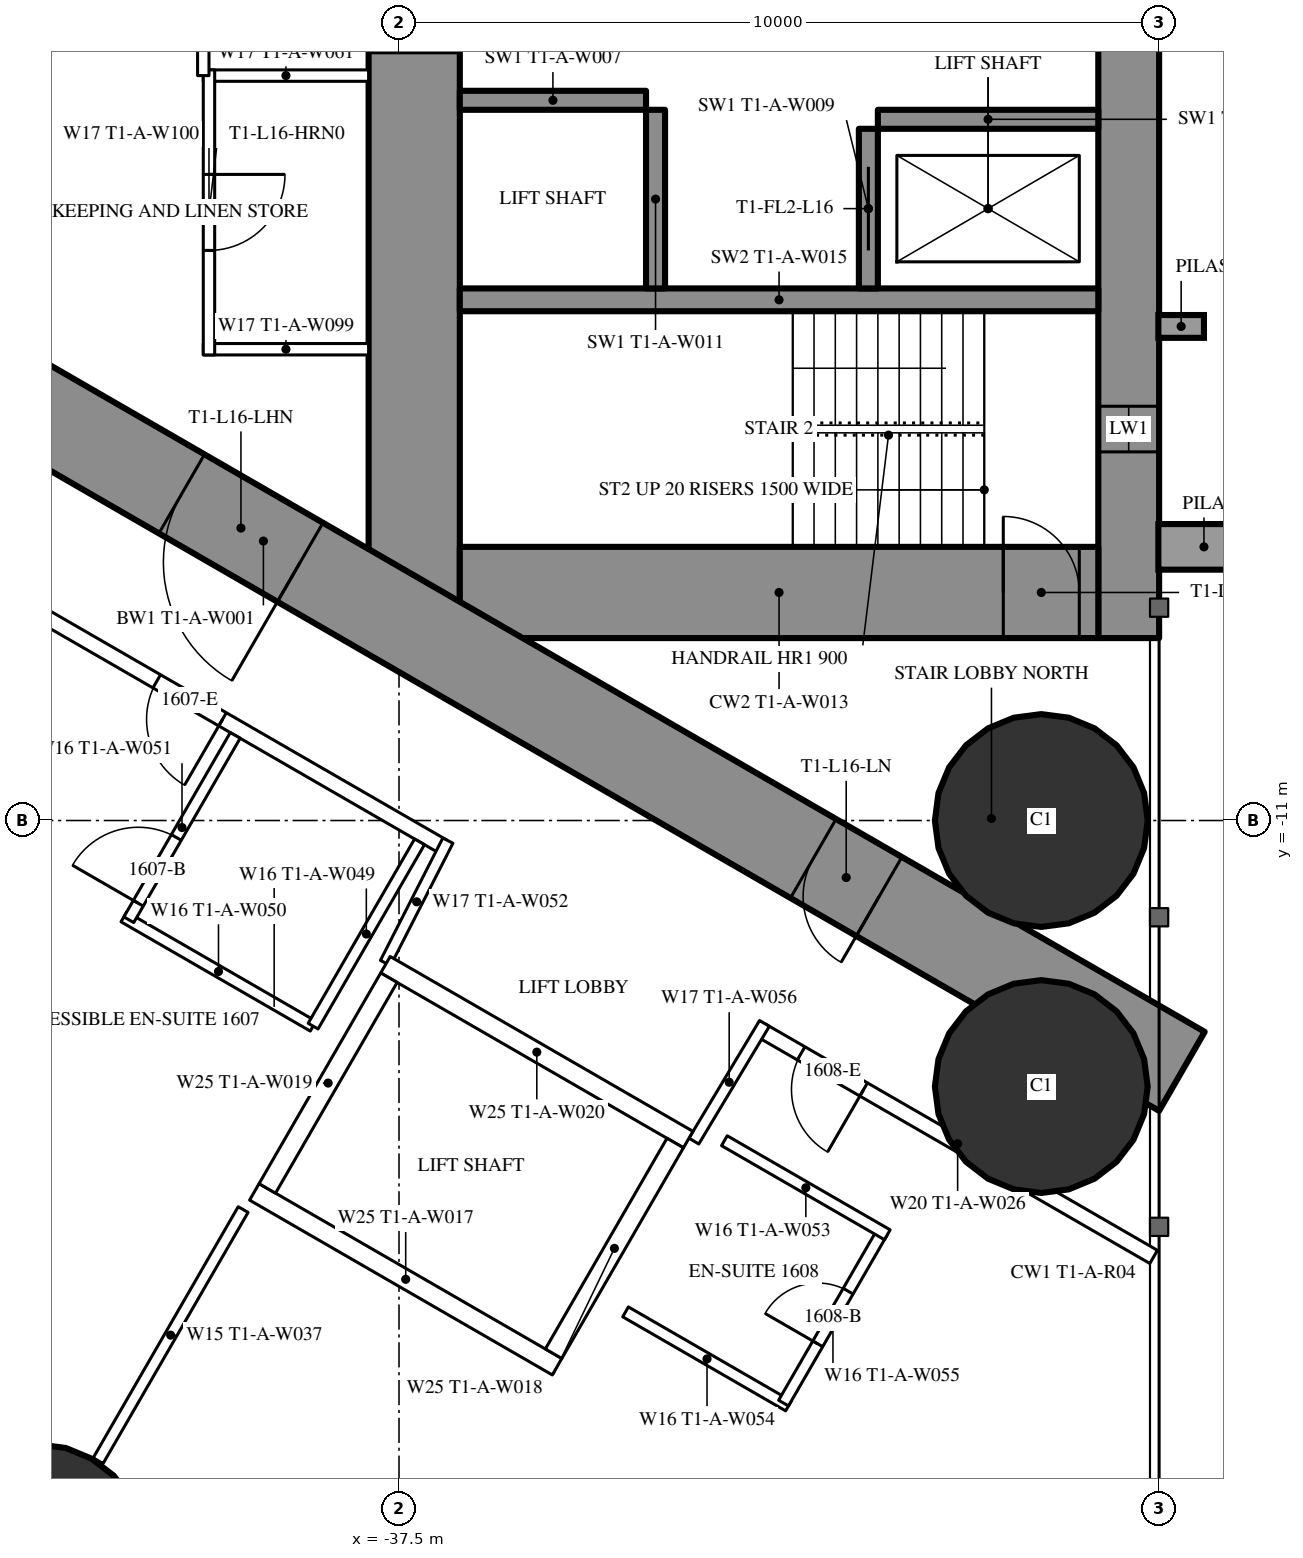
"""IFC4 building model, lengths in metres.
Left out: names, types, materials, properties, quantities, classifications, styles, units other than length and angle.
Written with IfcOpenShell. Run it as: python <this file> out.ifc"""

import sys

from ifc_helpers import new_model, si_unit, direction, frame, frame_2d, origin, origin_2d, place, context, subcontext, project, spatial, rectangle, hollow_circle, extrude, element, fill, save


model = new_model("IFC4")
c1 = context("Model", 3, precision=1e-05, world=origin(), true_north=direction((0.0, 1.0)))
c2 = subcontext(c1, "Body", "Model", "MODEL_VIEW")
j1 = project(units=[si_unit("LENGTHUNIT", "METRE"), si_unit("PLANEANGLEUNIT", "RADIAN")], contexts=[c1])
p1 = place(None, origin())
s1 = spatial("IfcSite", under=j1, at=p1, CompositionType="ELEMENT")
p2 = place(p1, origin())
s2 = spatial("IfcBuilding", under=s1, at=p2, CompositionType="ELEMENT")
p3 = place(p2, frame((0.0, 0.0, 63.5)))
s3 = spatial("IfcBuildingStorey", under=s2, at=p3, CompositionType="ELEMENT", Elevation=63.5)
for number, where, z_axis, x_axis in (
    (1, (-29.05, -11.0, 0.0), (0.0, 0.0, 1.0), (1.0, 0.0, 0.0)),
    (2, (-29.05, -14.5, 0.0), (0.0, 0.0, 1.0), (1.0, 0.0, 0.0)),
    (3, (-42.245, -20.607, 0.0), (0.0, 0.0, 1.0), (1.0, 0.0, 0.0)),
):
    element("IfcColumn", number, at=place(p3, frame(where, z_axis=z_axis, x_axis=x_axis)), inside=s3, PredefinedType="COLUMN", context=c2, shape_type="SweptSolid", body=[
        extrude(hollow_circle(Radius=1.4, WallThickness=0.12, at=origin_2d()), origin(), (0.0, 0.0, 1.0), 3.5),
    ])
p4 = place(p3, frame((-27.9, 8.6, 0.0), z_axis=(0.0, 0.0, 1.0), x_axis=(0.0, -1.0, 0.0)))
e4 = element("IfcWall", 4, at=p4, inside=s3, PredefinedType="SHEAR", context=c2, shape_type="SweptSolid", body=[
    extrude(rectangle(XDim=17.2, YDim=0.8, at=frame_2d((8.6, 0.0))), origin(), (0.0, 0.0, 1.0), 3.5),
])
p5 = place(p4, frame((2.45, 0.0, 0.6)))
e5 = element("IfcOpeningElement", 5, at=p5, cuts=e4, PredefinedType="OPENING", context=c2, shape_type="SweptSolid", body=[
    extrude(rectangle(XDim=0.6, YDim=2.1, at=frame_2d((0.3, 1.05))), frame((0.0, 0.41, 0.0), z_axis=(0.0, -1.0, 0.0), x_axis=(1.0, 0.0, 0.0)), (0.0, 0.0, 1.0), 0.82),
])
p6 = place(p4, frame((14.15, 0.0, 0.6)))
e6 = element("IfcOpeningElement", 6, at=p6, cuts=e4, PredefinedType="OPENING", context=c2, shape_type="SweptSolid", body=[
    extrude(rectangle(XDim=0.6, YDim=2.1, at=frame_2d((0.3, 1.05))), frame((0.0, 0.41, 0.0), z_axis=(0.0, -1.0, 0.0), x_axis=(1.0, 0.0, 0.0)), (0.0, 0.0, 1.0), 0.82),
])
p7 = place(p3, frame((-37.3, 8.6, 0.0), z_axis=(0.0, 0.0, 1.0), x_axis=(0.0, -1.0, 0.0)))
e7 = element("IfcWall", 7, at=p7, inside=s3, PredefinedType="SHEAR", context=c2, shape_type="SweptSolid", body=[
    extrude(rectangle(XDim=17.2, YDim=1.2, at=frame_2d((8.6, 0.0))), origin(), (0.0, 0.0, 1.0), 3.5),
])
p8 = place(p7, frame((7.7, 0.0, 0.0)))
e8 = element("IfcOpeningElement", 8, at=p8, cuts=e7, PredefinedType="OPENING", context=c2, shape_type="SweptSolid", body=[
    extrude(rectangle(XDim=1.8, YDim=2.2, at=frame_2d((0.9, 1.1))), frame((0.0, 0.61, 0.0), z_axis=(0.0, -1.0, 0.0), x_axis=(1.0, 0.0, 0.0)), (0.0, 0.0, 1.0), 1.22),
])
p9 = place(p3, frame((-28.3, -8.0, 0.0), z_axis=(0.0, 0.0, 1.0), x_axis=(-1.0, 0.0, 0.0)))
e9 = element("IfcWall", 9, at=p9, inside=s3, PredefinedType="SHEAR", context=c2, shape_type="SweptSolid", body=[
    extrude(rectangle(XDim=8.4, YDim=1.2, at=frame_2d((4.2, 0.0))), origin(), (0.0, 0.0, 1.0), 3.5),
])
p10 = place(p9, frame((0.25, 0.0, 0.0)))
e10 = element("IfcOpeningElement", 10, at=p10, cuts=e9, PredefinedType="OPENING", context=c2, shape_type="SweptSolid", body=[
    extrude(rectangle(XDim=1.0, YDim=2.2, at=frame_2d((0.5, 1.1))), frame((0.0, 0.61, 0.0), z_axis=(0.0, -1.0, 0.0), x_axis=(1.0, 0.0, 0.0)), (0.0, 0.0, 1.0), 1.22),
])
p11 = place(p3, frame((-28.3, -4.15, 0.0), z_axis=(0.0, 0.0, 1.0), x_axis=(-1.0, 0.0, 0.0)))
e11 = element("IfcWall", 11, at=p11, inside=s3, PredefinedType="SHEAR", context=c2, shape_type="SweptSolid", body=[
    extrude(rectangle(XDim=8.4, YDim=0.3, at=frame_2d((4.2, 0.0))), origin(), (0.0, 0.0, 1.0), 3.5),
])
p12 = place(p3, frame((-31.325, -1.9, 0.0), z_axis=(0.0, 0.0, 1.0), x_axis=(0.0, -1.0, 0.0)))
e12 = element("IfcWall", 12, at=p12, inside=s3, PredefinedType="SHEAR", context=c2, shape_type="SweptSolid", body=[
    extrude(rectangle(XDim=2.1, YDim=0.25, at=frame_2d((1.05, 0.0))), origin(), (0.0, 0.0, 1.0), 3.5),
])
p13 = place(p12, frame((0.5, 0.0, 0.0)))
e13 = element("IfcOpeningElement", 13, at=p13, cuts=e12, PredefinedType="OPENING", context=c2, shape_type="SweptSolid", body=[
    extrude(rectangle(XDim=1.1, YDim=2.2, at=frame_2d((0.55, 1.1))), frame((0.0, 0.135, 0.0), z_axis=(0.0, -1.0, 0.0), x_axis=(1.0, 0.0, 0.0)), (0.0, 0.0, 1.0), 0.27),
])
p14 = place(p3, frame((-34.125, -1.65, 0.0), z_axis=(0.0, 0.0, 1.0), x_axis=(0.0, -1.0, 0.0)))
e14 = element("IfcWall", 14, at=p14, inside=s3, PredefinedType="SHEAR", context=c2, shape_type="SweptSolid", body=[
    extrude(rectangle(XDim=2.35, YDim=0.25, at=frame_2d((1.175, 0.0))), origin(), (0.0, 0.0, 1.0), 3.5),
])
p15 = place(p3, frame((-28.3, -1.775, 0.0), z_axis=(0.0, 0.0, 1.0), x_axis=(-1.0, 0.0, 0.0)))
e15 = element("IfcWall", 15, at=p15, inside=s3, PredefinedType="SHEAR", context=c2, shape_type="SweptSolid", body=[
    extrude(rectangle(XDim=2.9, YDim=0.25, at=frame_2d((1.45, 0.0))), origin(), (0.0, 0.0, 1.0), 3.5),
])
p16 = place(p3, frame((-34.25, -1.525, 0.0), z_axis=(0.0, 0.0, 1.0), x_axis=(-1.0, 0.0, 0.0)))
e16 = element("IfcWall", 16, at=p16, inside=s3, PredefinedType="SHEAR", context=c2, shape_type="SweptSolid", body=[
    extrude(rectangle(XDim=2.45, YDim=0.25, at=frame_2d((1.225, 0.0))), origin(), (0.0, 0.0, 1.0), 3.5),
])
p17 = place(p3, frame((-27.2, -14.3, 0.0), z_axis=(0.0, 0.0, 1.0), x_axis=(-0.866024021859, 0.500002393557, 0.0)))
e17 = element("IfcWall", 17, at=p17, inside=s3, PredefinedType="SHEAR", context=c2, shape_type="SweptSolid", body=[
    extrude(rectangle(XDim=27.907, YDim=1.2, at=frame_2d((13.954, 0.0))), origin(), (0.0, 0.0, 1.0), 3.5),
])
p18 = place(p17, frame((4.6, 0.0, 0.0)))
e18 = element("IfcOpeningElement", 18, at=p18, cuts=e17, PredefinedType="OPENING", context=c2, shape_type="SweptSolid", body=[
    extrude(rectangle(XDim=1.0, YDim=2.2, at=frame_2d((0.5, 1.1))), frame((0.0, 0.61, 0.0), z_axis=(0.0, -1.0, 0.0), x_axis=(1.0, 0.0, 0.0)), (0.0, 0.0, 1.0), 1.22),
])
p19 = place(p17, frame((13.395, 0.0, 0.0)))
e19 = element("IfcOpeningElement", 19, at=p19, cuts=e17, PredefinedType="OPENING", context=c2, shape_type="SweptSolid", body=[
    extrude(rectangle(XDim=1.8, YDim=2.2, at=frame_2d((0.9, 1.1))), frame((0.0, 0.61, 0.0), z_axis=(0.0, -1.0, 0.0), x_axis=(1.0, 0.0, 0.0)), (0.0, 0.0, 1.0), 1.22),
])
p20 = place(p3, frame((-39.551, -16.118, 0.0), z_axis=(0.0, 0.0, 1.0), x_axis=(-0.499986503906, -0.866033195618, 0.0)))
e20 = element("IfcWall", 20, at=p20, inside=s3, PredefinedType="PARTITIONING", context=c2, shape_type="SweptSolid", body=[
    extrude(rectangle(XDim=3.815, YDim=0.15, at=frame_2d((1.907, 0.0))), origin(), (0.0, 0.0, 1.0), 3.25),
])
p21 = place(p3, frame((-27.572, -16.741, 0.0), z_axis=(0.0, 0.0, 1.0), x_axis=(-0.866024464444, 0.500001626982, 0.0)))
e21 = element("IfcWall", 21, at=p21, inside=s3, PredefinedType="PARTITIONING", context=c2, shape_type="SweptSolid", body=[
    extrude(rectangle(XDim=5.955, YDim=0.2, at=frame_2d((2.978, 0.0))), origin(), (0.0, 0.0, 1.0), 3.25),
])
p22 = place(p21, frame((4.405, 0.0, 0.0)))
e22 = element("IfcOpeningElement", 22, at=p22, cuts=e21, PredefinedType="OPENING", context=c2, shape_type="SweptSolid", body=[
    extrude(rectangle(XDim=0.95, YDim=2.2, at=frame_2d((0.475, 1.1))), frame((0.0, 0.11, 0.0), z_axis=(0.0, -1.0, 0.0), x_axis=(1.0, 0.0, 0.0)), (0.0, 0.0, 1.0), 0.22),
])
p23 = place(p3, frame((-36.92, -11.344, 0.0), z_axis=(0.0, 0.0, 1.0), x_axis=(-0.866028313256, 0.499994960614, 0.0)))
e23 = element("IfcWall", 23, at=p23, inside=s3, PredefinedType="PARTITIONING", context=c2, shape_type="SweptSolid", body=[
    extrude(rectangle(XDim=22.568, YDim=0.2, at=frame_2d((11.284, 0.0))), origin(), (0.0, 0.0, 1.0), 3.25),
])
p24 = place(p23, frame((18.668, 0.0, 0.0)))
e24 = element("IfcOpeningElement", 24, at=p24, cuts=e23, PredefinedType="OPENING", context=c2, shape_type="SweptSolid", body=[
    extrude(rectangle(XDim=0.95, YDim=2.2, at=frame_2d((0.475, 1.1))), frame((0.0, 0.11, 0.0), z_axis=(0.0, -1.0, 0.0), x_axis=(1.0, 0.0, 0.0)), (0.0, 0.0, 1.0), 0.22),
])
p25 = place(p23, frame((3.35, 0.0, 0.0)))
e25 = element("IfcOpeningElement", 25, at=p25, cuts=e23, PredefinedType="OPENING", context=c2, shape_type="SweptSolid", body=[
    extrude(rectangle(XDim=1.0, YDim=2.2, at=frame_2d((0.5, 1.1))), frame((0.0, 0.11, 0.0), z_axis=(0.0, -1.0, 0.0), x_axis=(1.0, 0.0, 0.0)), (0.0, 0.0, 1.0), 0.22),
])
p26 = place(p3, frame((-36.857, -11.265, 0.0), z_axis=(0.0, 0.0, 1.0), x_axis=(-0.454225294761, -0.890886851176, 0.0)))
e26 = element("IfcWall", 26, at=p26, inside=s3, PredefinedType="PARTITIONING", context=c2, shape_type="SweptSolid", body=[
    extrude(rectangle(XDim=1.807, YDim=0.15, at=frame_2d((0.904, 0.0))), origin(), (0.0, 0.0, 1.0), 3.25),
])
p27 = place(p3, frame((-33.621, -15.218, 0.0), z_axis=(0.0, 0.0, 1.0), x_axis=(0.514336634837, 0.857588377991, 0.0)))
e27 = element("IfcWall", 27, at=p27, inside=s3, PredefinedType="PARTITIONING", context=c2, shape_type="SweptSolid", body=[
    extrude(rectangle(XDim=1.805, YDim=0.15, at=frame_2d((0.903, 0.0))), origin(), (0.0, 0.0, 1.0), 3.25),
])
p28 = place(p3, frame((-38.63, -13.705, 0.0), z_axis=(0.0, 0.0, 1.0), x_axis=(-0.866018712932, 0.500011588718, 0.0)))
e28 = element("IfcWall", 28, at=p28, inside=s3, PredefinedType="PARTITIONING", context=c2, shape_type="SweptSolid", body=[
    extrude(rectangle(XDim=2.875, YDim=0.15, at=frame_2d((1.438, 0.0))), origin(), (0.0, 0.0, 1.0), 3.25),
])
p29 = place(p3, frame((-39.655, -9.88, 0.0), z_axis=(0.0, 0.0, 1.0), x_axis=(-0.500049511043, -0.865996816683, 0.0)))
e29 = element("IfcWall", 29, at=p29, inside=s3, PredefinedType="PARTITIONING", context=c2, shape_type="SweptSolid", body=[
    extrude(rectangle(XDim=2.8, YDim=0.15, at=frame_2d((1.4, 0.0))), origin(), (0.0, 0.0, 1.0), 3.25),
])
p30 = place(p29, frame((1.55, 0.0, 0.0)))
e30 = element("IfcOpeningElement", 30, at=p30, cuts=e29, PredefinedType="OPENING", context=c2, shape_type="SweptSolid", body=[
    extrude(rectangle(XDim=1.0, YDim=2.2, at=frame_2d((0.5, 1.1))), frame((0.0, 0.085, 0.0), z_axis=(0.0, -1.0, 0.0), x_axis=(1.0, 0.0, 0.0)), (0.0, 0.0, 1.0), 0.17),
])
p31 = place(p3, frame((-37.23, -11.281, 0.0), z_axis=(0.0, 0.0, 1.0), x_axis=(-0.500049511043, -0.865996816683, 0.0)))
e31 = element("IfcWall", 31, at=p31, inside=s3, PredefinedType="PARTITIONING", context=c2, shape_type="SweptSolid", body=[
    extrude(rectangle(XDim=2.8, YDim=0.15, at=frame_2d((1.4, 0.0))), origin(), (0.0, 0.0, 1.0), 3.25),
])
p32 = place(p3, frame((-32.376, -18.702, 0.0), z_axis=(0.0, 0.0, 1.0), x_axis=(-0.866006523861, 0.500032699561, 0.0)))
e32 = element("IfcWall", 32, at=p32, inside=s3, PredefinedType="PARTITIONING", context=c2, shape_type="SweptSolid", body=[
    extrude(rectangle(XDim=2.475, YDim=0.15, at=frame_2d((1.237, 0.0))), origin(), (0.0, 0.0, 1.0), 3.25),
])
p33 = place(p3, frame((-31.141, -16.413, 0.0), z_axis=(0.0, 0.0, 1.0), x_axis=(-0.500006934395, -0.866021400173, 0.0)))
e33 = element("IfcWall", 33, at=p33, inside=s3, PredefinedType="PARTITIONING", context=c2, shape_type="SweptSolid", body=[
    extrude(rectangle(XDim=2.6, YDim=0.15, at=frame_2d((1.3, 0.0))), origin(), (0.0, 0.0, 1.0), 3.25),
])
p34 = place(p33, frame((0.9, 0.0, 0.0)))
e34 = element("IfcOpeningElement", 34, at=p34, cuts=e33, PredefinedType="OPENING", context=c2, shape_type="SweptSolid", body=[
    extrude(rectangle(XDim=0.8, YDim=2.2, at=frame_2d((0.4, 1.1))), frame((0.0, 0.085, 0.0), z_axis=(0.0, -1.0, 0.0), x_axis=(1.0, 0.0, 0.0)), (0.0, 0.0, 1.0), 0.17),
])
p35 = place(p3, frame((-31.076, -16.45, 0.0), z_axis=(0.0, 0.0, 1.0), x_axis=(-0.866073894602, 0.499916002032, 0.0)))
e35 = element("IfcWall", 35, at=p35, inside=s3, PredefinedType="PARTITIONING", context=c2, shape_type="SweptSolid", body=[
    extrude(rectangle(XDim=2.475, YDim=0.15, at=frame_2d((1.238, 0.0))), origin(), (0.0, 0.0, 1.0), 3.25),
])
for number, where, z_axis, x_axis in (
    (36, (-37.9, -1.2, 0.0), (0.0, 0.0, 1.0), (-1.0, 0.0, 0.0)),
    (37, (-37.9, -4.8, 0.0), (0.0, 0.0, 1.0), (-1.0, 0.0, 0.0)),
):
    element("IfcWall", number, at=place(p3, frame(where, z_axis=z_axis, x_axis=x_axis)), inside=s3, PredefinedType="PARTITIONING", context=c2, shape_type="SweptSolid", body=[
        extrude(rectangle(XDim=2.175, YDim=0.15, at=frame_2d((1.087, 0.0))), origin(), (0.0, 0.0, 1.0), 3.25),
    ])
p36 = place(p3, frame((-40.0, -1.125, 0.0), z_axis=(0.0, 0.0, 1.0), x_axis=(0.0, -1.0, 0.0)))
e38 = element("IfcWall", 38, at=p36, inside=s3, PredefinedType="PARTITIONING", context=c2, shape_type="SweptSolid", body=[
    extrude(rectangle(XDim=3.75, YDim=0.15, at=frame_2d((1.875, 0.0))), origin(), (0.0, 0.0, 1.0), 3.25),
])
p37 = place(p36, frame((1.375, 0.0, 0.0)))
e39 = element("IfcOpeningElement", 39, at=p37, cuts=e38, PredefinedType="OPENING", context=c2, shape_type="SweptSolid", body=[
    extrude(rectangle(XDim=1.0, YDim=2.2, at=frame_2d((0.5, 1.1))), frame((0.0, 0.085, 0.0), z_axis=(0.0, -1.0, 0.0), x_axis=(1.0, 0.0, 0.0)), (0.0, 0.0, 1.0), 0.17),
])
p38 = place(p3, frame((-40.075, 6.174, 0.0), z_axis=(0.0, 0.0, 1.0), x_axis=(0.0, -1.0, 0.0)))
e40 = element("IfcWall", 40, at=p38, inside=s3, PredefinedType="PARTITIONING", context=c2, shape_type="SweptSolid", body=[
    extrude(rectangle(XDim=7.374, YDim=0.15, at=frame_2d((3.687, 0.0))), origin(), (0.0, 0.0, 1.0), 3.25),
])
p39 = place(p38, frame((2.787, 0.0, 0.0)))
e41 = element("IfcOpeningElement", 41, at=p39, cuts=e40, PredefinedType="OPENING", context=c2, shape_type="SweptSolid", body=[
    extrude(rectangle(XDim=1.8, YDim=2.2, at=frame_2d((0.9, 1.1))), frame((0.0, 0.085, 0.0), z_axis=(0.0, -1.0, 0.0), x_axis=(1.0, 0.0, 0.0)), (0.0, 0.0, 1.0), 0.17),
])
p40 = place(p3, frame((-33.696, -15.197, 0.0), z_axis=(0.0, 0.0, 1.0), x_axis=(-0.865976953817, 0.500083908417, 0.0)))
e42 = element("IfcWall", 42, at=p40, inside=s3, PredefinedType="PARTITIONING", context=c2, shape_type="SweptSolid", body=[
    extrude(rectangle(XDim=4.599, YDim=0.25, at=frame_2d((2.3, 0.0))), origin(), (0.0, 0.0, 1.0), 3.25),
])
p41 = place(p3, frame((-35.42, -18.186, 0.0), z_axis=(0.0, 0.0, 1.0), x_axis=(-0.865990227814, 0.50006092162, 0.0)))
e43 = element("IfcWall", 43, at=p41, inside=s3, PredefinedType="PARTITIONING", context=c2, shape_type="SweptSolid", body=[
    extrude(rectangle(XDim=4.6, YDim=0.25, at=frame_2d((2.3, 0.0))), origin(), (0.0, 0.0, 1.0), 3.25),
])
p42 = place(p3, frame((-33.866, -15.243, 0.0), z_axis=(0.0, 0.0, 1.0), x_axis=(-0.499929347863, -0.866066190972, 0.0)))
e44 = element("IfcWall", 44, at=p42, inside=s3, PredefinedType="PARTITIONING", context=c2, shape_type="SweptSolid", body=[
    extrude(rectangle(XDim=3.201, YDim=0.25, at=frame_2d((1.6, 0.0))), origin(), (0.0, 0.0, 1.0), 3.25),
])
p43 = place(p3, frame((-37.633, -13.068, 0.0), z_axis=(0.0, 0.0, 1.0), x_axis=(-0.499872130319, -0.866099216793, 0.0)))
e45 = element("IfcWall", 45, at=p43, inside=s3, PredefinedType="PARTITIONING", context=c2, shape_type="SweptSolid", body=[
    extrude(rectangle(XDim=3.2, YDim=0.25, at=frame_2d((1.6, 0.0))), origin(), (0.0, 0.0, 1.0), 3.25),
])
p44 = place(p30, origin())
e46 = element("IfcDoor", 46, at=p44, inside=s3, OperationType="SINGLE_SWING_RIGHT", PredefinedType="DOOR", context=c2, shape_type="SweptSolid", body=[
    extrude(rectangle(XDim=1.0, YDim=2.2, at=frame_2d((0.5, 1.1))), frame((0.0, 0.025, 0.0), z_axis=(0.0, -1.0, 0.0), x_axis=(1.0, 0.0, 0.0)), (0.0, 0.0, 1.0), 0.05),
])
fill(e30, e46)
p45 = place(p25, origin())
e47 = element("IfcDoor", 47, at=p45, inside=s3, OperationType="SINGLE_SWING_LEFT", PredefinedType="DOOR", context=c2, shape_type="SweptSolid", body=[
    extrude(rectangle(XDim=1.0, YDim=2.2, at=frame_2d((0.5, 1.1))), frame((0.0, 0.025, 0.0), z_axis=(0.0, -1.0, 0.0), x_axis=(1.0, 0.0, 0.0)), (0.0, 0.0, 1.0), 0.05),
])
fill(e25, e47)
p46 = place(p34, origin())
e48 = element("IfcDoor", 48, at=p46, inside=s3, OperationType="SINGLE_SWING_RIGHT", PredefinedType="DOOR", context=c2, shape_type="SweptSolid", body=[
    extrude(rectangle(XDim=0.8, YDim=2.2, at=frame_2d((0.4, 1.1))), frame((0.0, 0.025, 0.0), z_axis=(0.0, -1.0, 0.0), x_axis=(1.0, 0.0, 0.0)), (0.0, 0.0, 1.0), 0.05),
])
fill(e34, e48)
p47 = place(p22, origin())
e49 = element("IfcDoor", 49, at=p47, inside=s3, OperationType="SINGLE_SWING_LEFT", PredefinedType="DOOR", context=c2, shape_type="SweptSolid", body=[
    extrude(rectangle(XDim=0.95, YDim=2.2, at=frame_2d((0.475, 1.1))), frame((0.0, 0.025, 0.0), z_axis=(0.0, -1.0, 0.0), x_axis=(1.0, 0.0, 0.0)), (0.0, 0.0, 1.0), 0.05),
])
fill(e22, e49)
p48 = place(p37, origin())
e50 = element("IfcDoor", 50, at=p48, inside=s3, OperationType="SINGLE_SWING_LEFT", PredefinedType="DOOR", context=c2, shape_type="SweptSolid", body=[
    extrude(rectangle(XDim=1.0, YDim=2.2, at=frame_2d((0.5, 1.1))), frame((0.0, 0.025, 0.0), z_axis=(0.0, -1.0, 0.0), x_axis=(1.0, 0.0, 0.0)), (0.0, 0.0, 1.0), 0.05),
])
fill(e39, e50)
p49 = place(p18, origin())
e51 = element("IfcDoor", 51, at=p49, inside=s3, OperationType="SINGLE_SWING_LEFT", PredefinedType="DOOR", context=c2, shape_type="SweptSolid", body=[
    extrude(rectangle(XDim=1.0, YDim=2.2, at=frame_2d((0.5, 1.1))), frame((0.0, 0.025, 0.0), z_axis=(0.0, -1.0, 0.0), x_axis=(1.0, 0.0, 0.0)), (0.0, 0.0, 1.0), 0.05),
])
fill(e18, e51)
p50 = place(p19, origin())
e52 = element("IfcDoor", 52, at=p50, inside=s3, OperationType="DOUBLE_DOOR_SINGLE_SWING", PredefinedType="DOOR", context=c2, shape_type="SweptSolid", body=[
    extrude(rectangle(XDim=1.8, YDim=2.2, at=frame_2d((0.9, 1.1))), frame((0.0, 0.025, 0.0), z_axis=(0.0, -1.0, 0.0), x_axis=(1.0, 0.0, 0.0)), (0.0, 0.0, 1.0), 0.05),
])
fill(e19, e52)
p51 = place(p10, origin())
e53 = element("IfcDoor", 53, at=p51, inside=s3, OperationType="SINGLE_SWING_RIGHT", PredefinedType="DOOR", context=c2, shape_type="SweptSolid", body=[
    extrude(rectangle(XDim=1.0, YDim=2.2, at=frame_2d((0.5, 1.1))), frame((0.0, 0.025, 0.0), z_axis=(0.0, -1.0, 0.0), x_axis=(1.0, 0.0, 0.0)), (0.0, 0.0, 1.0), 0.05),
])
fill(e10, e53)
p52 = place(p13, origin())
e54 = element("IfcDoor", 54, at=p52, inside=s3, OperationType="SLIDING_TO_LEFT", PredefinedType="USERDEFINED", context=c2, shape_type="SweptSolid", body=[
    extrude(rectangle(XDim=1.1, YDim=2.2, at=frame_2d((0.55, 1.1))), frame((0.0, 0.025, 0.0), z_axis=(0.0, -1.0, 0.0), x_axis=(1.0, 0.0, 0.0)), (0.0, 0.0, 1.0), 0.05),
])
fill(e13, e54)
p53 = place(p6, origin())
e55 = element("IfcWindow", 55, at=p53, inside=s3, PartitioningType="SINGLE_PANEL", PredefinedType="WINDOW", context=c2, shape_type="SweptSolid", body=[
    extrude(rectangle(XDim=0.6, YDim=2.1, at=frame_2d((0.3, 1.05))), frame((0.0, 0.03, 0.0), z_axis=(0.0, -1.0, 0.0), x_axis=(1.0, 0.0, 0.0)), (0.0, 0.0, 1.0), 0.06),
])
fill(e6, e55)
save(model, sys.argv[1])
